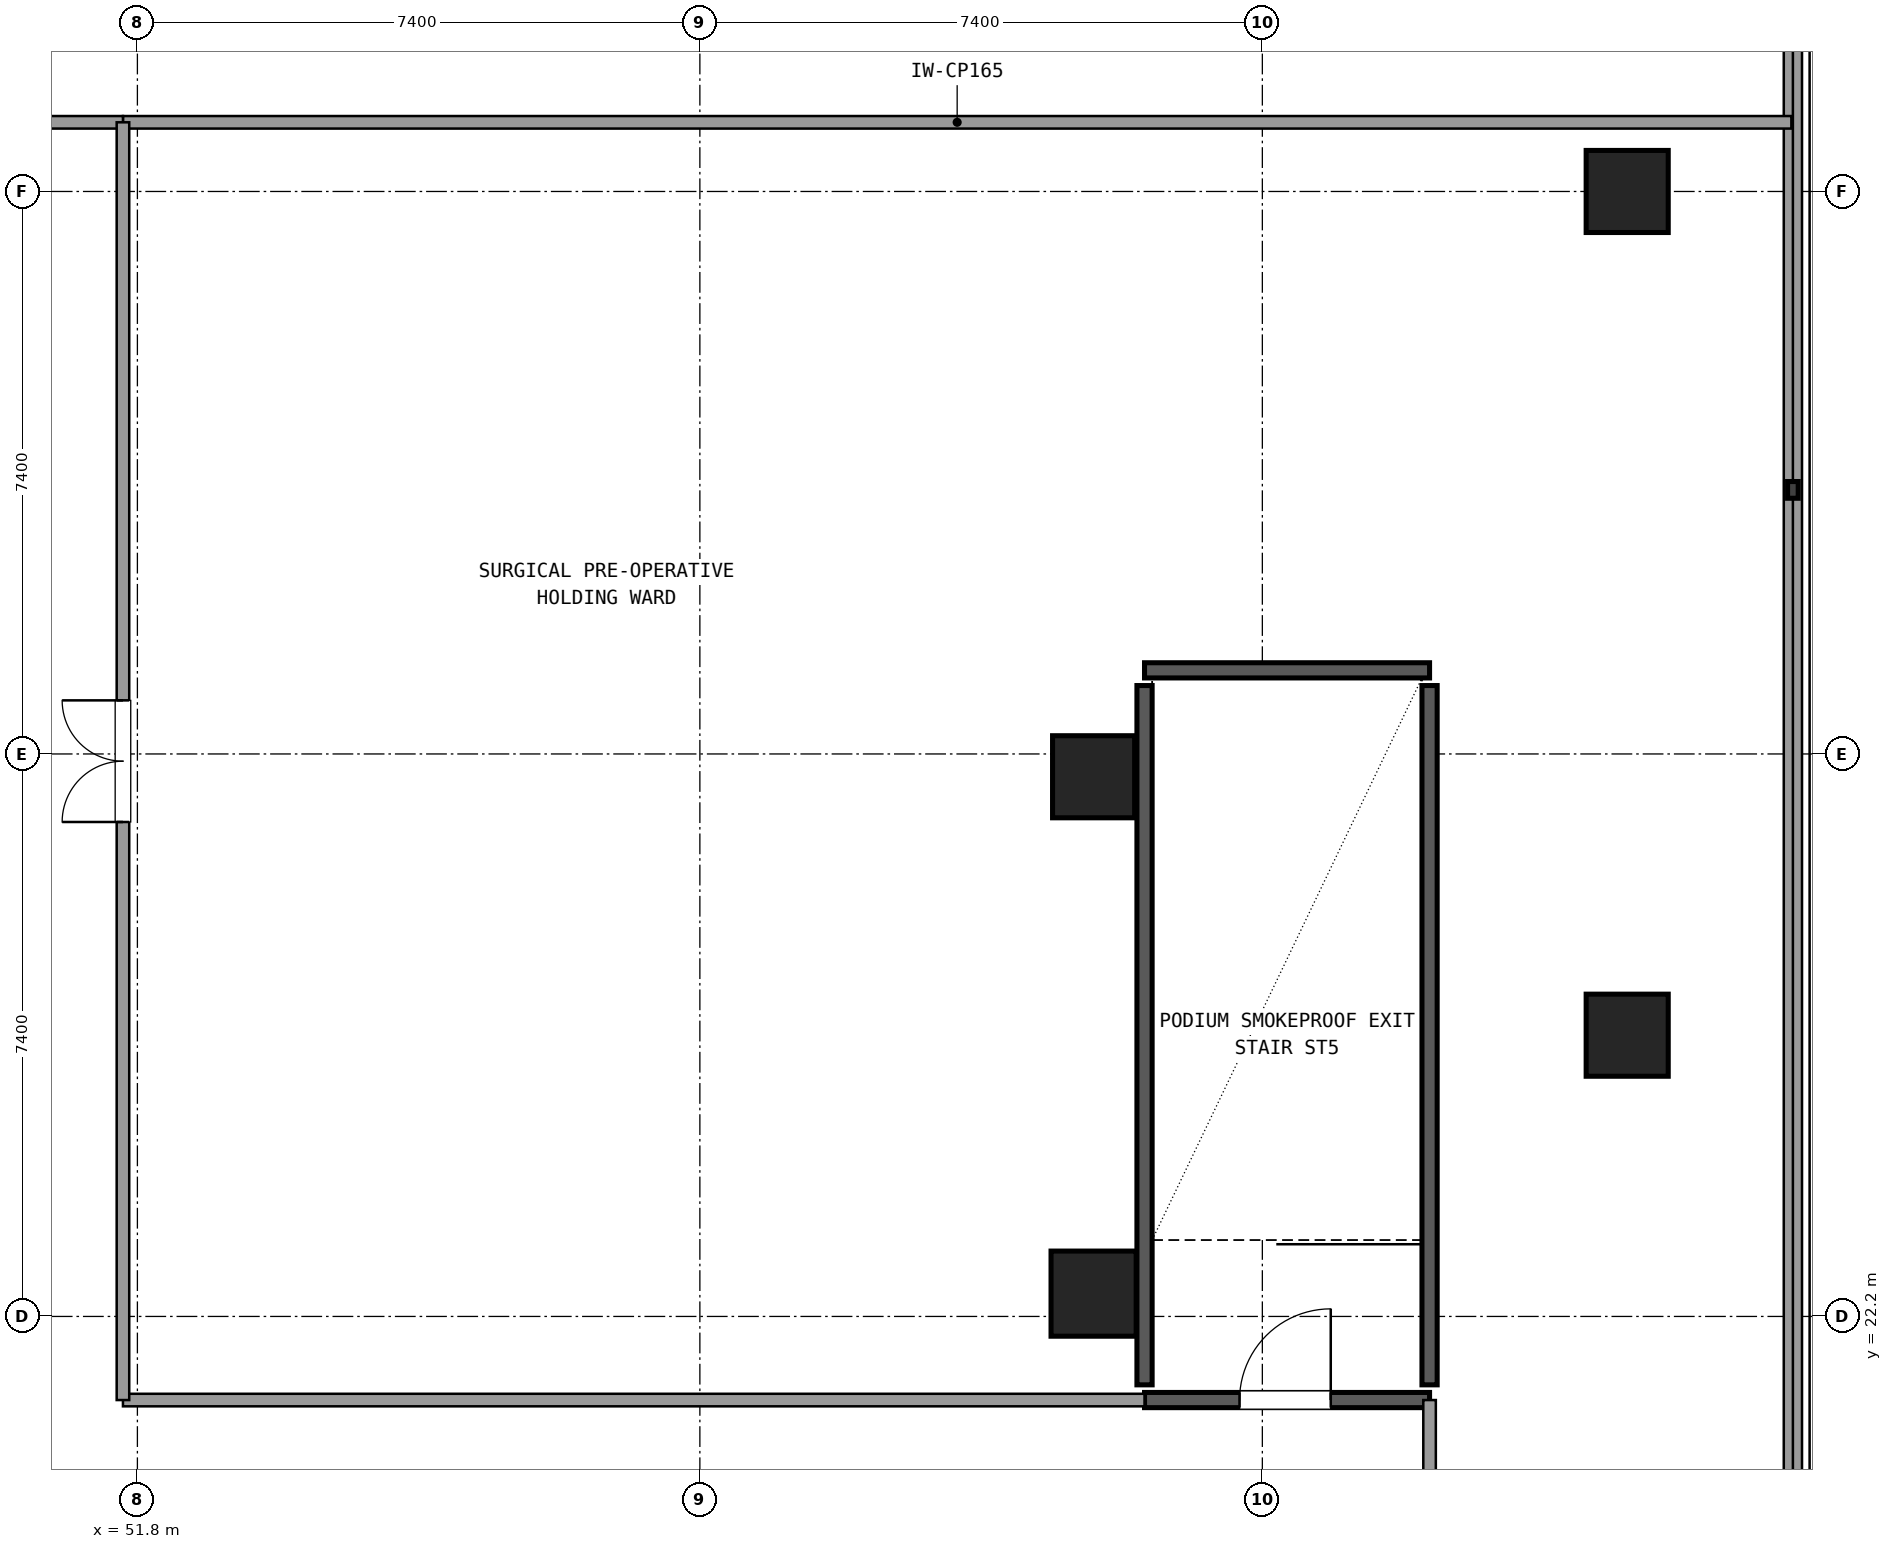
"""IFC4 building model, lengths in metres.
Left out: names, types, materials, properties, quantities, classifications, styles, units other than length and angle.
Written with IfcOpenShell. Run it as: python <this file> out.ifc"""

import sys

from ifc_helpers import new_model, si_unit, direction, frame, frame_2d, origin, origin_2d, place, context, subcontext, project, spatial, rectangle, circle, extrude, element, fill, save


model = new_model("IFC4")
c1 = context("Model", 3, precision=1e-05, world=origin(), true_north=direction((0.0, 1.0)))
c2 = subcontext(c1, "Body", "Model", "MODEL_VIEW")
j1 = project(units=[si_unit("LENGTHUNIT", "METRE"), si_unit("PLANEANGLEUNIT", "RADIAN")], contexts=[c1])
p1 = place(None, origin())
s1 = spatial("IfcSite", under=j1, at=p1, CompositionType="ELEMENT")
p2 = place(p1, origin())
s2 = spatial("IfcBuilding", under=s1, at=p2, CompositionType="ELEMENT")
p3 = place(p2, frame((0.0, 0.0, 18.9)))
s3 = spatial("IfcBuildingStorey", under=s2, at=p3, CompositionType="ELEMENT", Elevation=18.9)
p4 = place(p3, frame((64.38, 22.5, 0.0), z_axis=(0.0, 0.0, 1.0), x_axis=(1.0, 0.0, 0.0)))
e1 = element("IfcColumn", 1, at=p4, inside=s3, PredefinedType="COLUMN", context=c2, shape_type="SweptSolid", body=[
    extrude(circle(Radius=0.56, at=origin_2d()), origin(), (0.0, 0.0, 1.0), 5.04),
])
for number, where, z_axis, x_axis in (
    (2, (64.38, 29.3, 0.0), (0.0, 0.0, 1.0), (1.0, 0.0, 0.0)),
    (3, (71.4, 25.9, 0.0), (0.0, 0.0, 1.0), (1.0, 0.0, 0.0)),
    (4, (71.4, 37.0, 0.0), (0.0, 0.0, 1.0), (1.0, 0.0, 0.0)),
):
    element("IfcColumn", number, at=place(p3, frame(where, z_axis=z_axis, x_axis=x_axis)), inside=s3, PredefinedType="COLUMN", context=c2, shape_type="SweptSolid", body=[
        extrude(rectangle(XDim=1.08, YDim=1.08, at=origin_2d()), origin(), (0.0, 0.0, 1.0), 5.04),
    ])
p5 = place(p3, frame((73.58, 4.379, 0.0), z_axis=(0.0, 0.0, 1.0), x_axis=(0.0, 1.0, 0.0)))
e5 = element("IfcWall", 5, at=p5, inside=s3, PredefinedType="SOLIDWALL", context=c2, shape_type="SweptSolid", body=[
    extrude(rectangle(XDim=43.042, YDim=0.24, at=frame_2d((21.521, 0.0))), origin(), (0.0, 0.0, 1.0), 0.85),
])
p6 = place(p3, frame((65.05, 21.1, 0.0), z_axis=(0.0, 0.0, 1.0), x_axis=(1.0, 0.0, 0.0)))
e6 = element("IfcWall", 6, at=p6, inside=s3, PredefinedType="SHEAR", context=c2, shape_type="SweptSolid", body=[
    extrude(rectangle(XDim=3.75, YDim=0.2, at=frame_2d((1.875, 0.0))), origin(), (0.0, 0.0, 1.0), 4.76),
])
p7 = place(p6, frame((1.25, 0.0, 0.0)))
e7 = element("IfcOpeningElement", 7, at=p7, cuts=e6, PredefinedType="OPENING", context=c2, shape_type="SweptSolid", body=[
    extrude(rectangle(XDim=1.2, YDim=2.15, at=frame_2d((0.6, 1.075))), frame((0.0, 0.11, 0.0), z_axis=(0.0, -1.0, 0.0), x_axis=(1.0, 0.0, 0.0)), (0.0, 0.0, 1.0), 0.22),
])
p8 = place(p3, frame((65.05, 30.7, 0.0), z_axis=(0.0, 0.0, 1.0), x_axis=(1.0, 0.0, 0.0)))
e8 = element("IfcWall", 8, at=p8, inside=s3, PredefinedType="SHEAR", context=c2, shape_type="SweptSolid", body=[
    extrude(rectangle(XDim=3.75, YDim=0.2, at=frame_2d((1.875, 0.0))), origin(), (0.0, 0.0, 1.0), 4.76),
])
for number, where, z_axis, x_axis in (
    (9, (65.05, 21.3, 0.0), (0.0, 0.0, 1.0), (0.0, 1.0, 0.0)),
    (10, (68.8, 21.3, 0.0), (0.0, 0.0, 1.0), (0.0, 1.0, 0.0)),
):
    element("IfcWall", number, at=place(p3, frame(where, z_axis=z_axis, x_axis=x_axis)), inside=s3, PredefinedType="SHEAR", context=c2, shape_type="SweptSolid", body=[
        extrude(rectangle(XDim=9.2, YDim=0.2, at=frame_2d((4.6, 0.0))), origin(), (0.0, 0.0, 1.0), 4.76),
    ])
p9 = place(p3, frame((51.61, 37.91, 0.0), z_axis=(0.0, 0.0, 1.0), x_axis=(1.0, 0.0, 0.0)))
e11 = element("IfcWall", 11, at=p9, inside=s3, PredefinedType="PARTITIONING", context=c2, shape_type="SweptSolid", body=[
    extrude(rectangle(XDim=21.95, YDim=0.165, at=frame_2d((10.975, 0.0))), origin(), (0.0, 0.0, 1.0), 3.13),
])
p10 = place(p3, frame((68.8, 18.17, 0.0), z_axis=(0.0, 0.0, 1.0), x_axis=(0.0, 1.0, 0.0)))
e12 = element("IfcWall", 12, at=p10, inside=s3, PredefinedType="PARTITIONING", context=c2, shape_type="SweptSolid", body=[
    extrude(rectangle(XDim=2.93, YDim=0.165, at=frame_2d((1.465, 0.0))), origin(), (0.0, 0.0, 1.0), 3.13),
])
p11 = place(p3, frame((51.61, 21.1, 0.0), z_axis=(0.0, 0.0, 1.0), x_axis=(1.0, 0.0, 0.0)))
e13 = element("IfcWall", 13, at=p11, inside=s3, PredefinedType="PARTITIONING", context=c2, shape_type="SweptSolid", body=[
    extrude(rectangle(XDim=13.44, YDim=0.165, at=frame_2d((6.72, 0.0))), origin(), (0.0, 0.0, 1.0), 3.13),
])
p12 = place(p3, frame((35.4, 37.91, 0.0), z_axis=(0.0, 0.0, 1.0), x_axis=(1.0, 0.0, 0.0)))
e14 = element("IfcWall", 14, at=p12, inside=s3, PredefinedType="PARTITIONING", context=c2, shape_type="SweptSolid", body=[
    extrude(rectangle(XDim=16.21, YDim=0.165, at=frame_2d((8.105, 0.0))), origin(), (0.0, 0.0, 1.0), 3.13),
])
p13 = place(p12, frame((7.305, 0.0, 0.0)))
e15 = element("IfcOpeningElement", 15, at=p13, cuts=e14, PredefinedType="OPENING", context=c2, shape_type="SweptSolid", body=[
    extrude(rectangle(XDim=1.6, YDim=2.2, at=frame_2d((0.8, 1.1))), frame((0.0, 0.093, 0.0), z_axis=(0.0, -1.0, 0.0), x_axis=(1.0, 0.0, 0.0)), (0.0, 0.0, 1.0), 0.185),
])
p14 = place(p3, frame((51.61, 21.1, 0.0), z_axis=(0.0, 0.0, 1.0), x_axis=(0.0, 1.0, 0.0)))
e16 = element("IfcWall", 16, at=p14, inside=s3, PredefinedType="PARTITIONING", context=c2, shape_type="SweptSolid", body=[
    extrude(rectangle(XDim=16.81, YDim=0.165, at=frame_2d((8.405, 0.0))), origin(), (0.0, 0.0, 1.0), 3.13),
])
p15 = place(p14, frame((7.605, 0.0, 0.0)))
e17 = element("IfcOpeningElement", 17, at=p15, cuts=e16, PredefinedType="OPENING", context=c2, shape_type="SweptSolid", body=[
    extrude(rectangle(XDim=1.6, YDim=2.2, at=frame_2d((0.8, 1.1))), frame((0.0, 0.093, 0.0), z_axis=(0.0, -1.0, 0.0), x_axis=(1.0, 0.0, 0.0)), (0.0, 0.0, 1.0), 0.185),
])
p16 = place(p7, origin())
e18 = element("IfcDoor", 18, at=p16, inside=s3, OperationType="SINGLE_SWING_RIGHT", PredefinedType="DOOR", context=c2, shape_type="SweptSolid", body=[
    extrude(rectangle(XDim=1.2, YDim=2.15, at=frame_2d((0.6, 1.075))), frame((0.0, 0.025, 0.0), z_axis=(0.0, -1.0, 0.0), x_axis=(1.0, 0.0, 0.0)), (0.0, 0.0, 1.0), 0.05),
])
fill(e7, e18)
p17 = place(p15, origin())
e19 = element("IfcDoor", 19, at=p17, inside=s3, OperationType="DOUBLE_DOOR_SINGLE_SWING", PredefinedType="DOOR", context=c2, shape_type="SweptSolid", body=[
    extrude(rectangle(XDim=1.6, YDim=2.2, at=frame_2d((0.8, 1.1))), frame((0.0, 0.025, 0.0), z_axis=(0.0, -1.0, 0.0), x_axis=(1.0, 0.0, 0.0)), (0.0, 0.0, 1.0), 0.05),
])
fill(e17, e19)
save(model, sys.argv[1])
